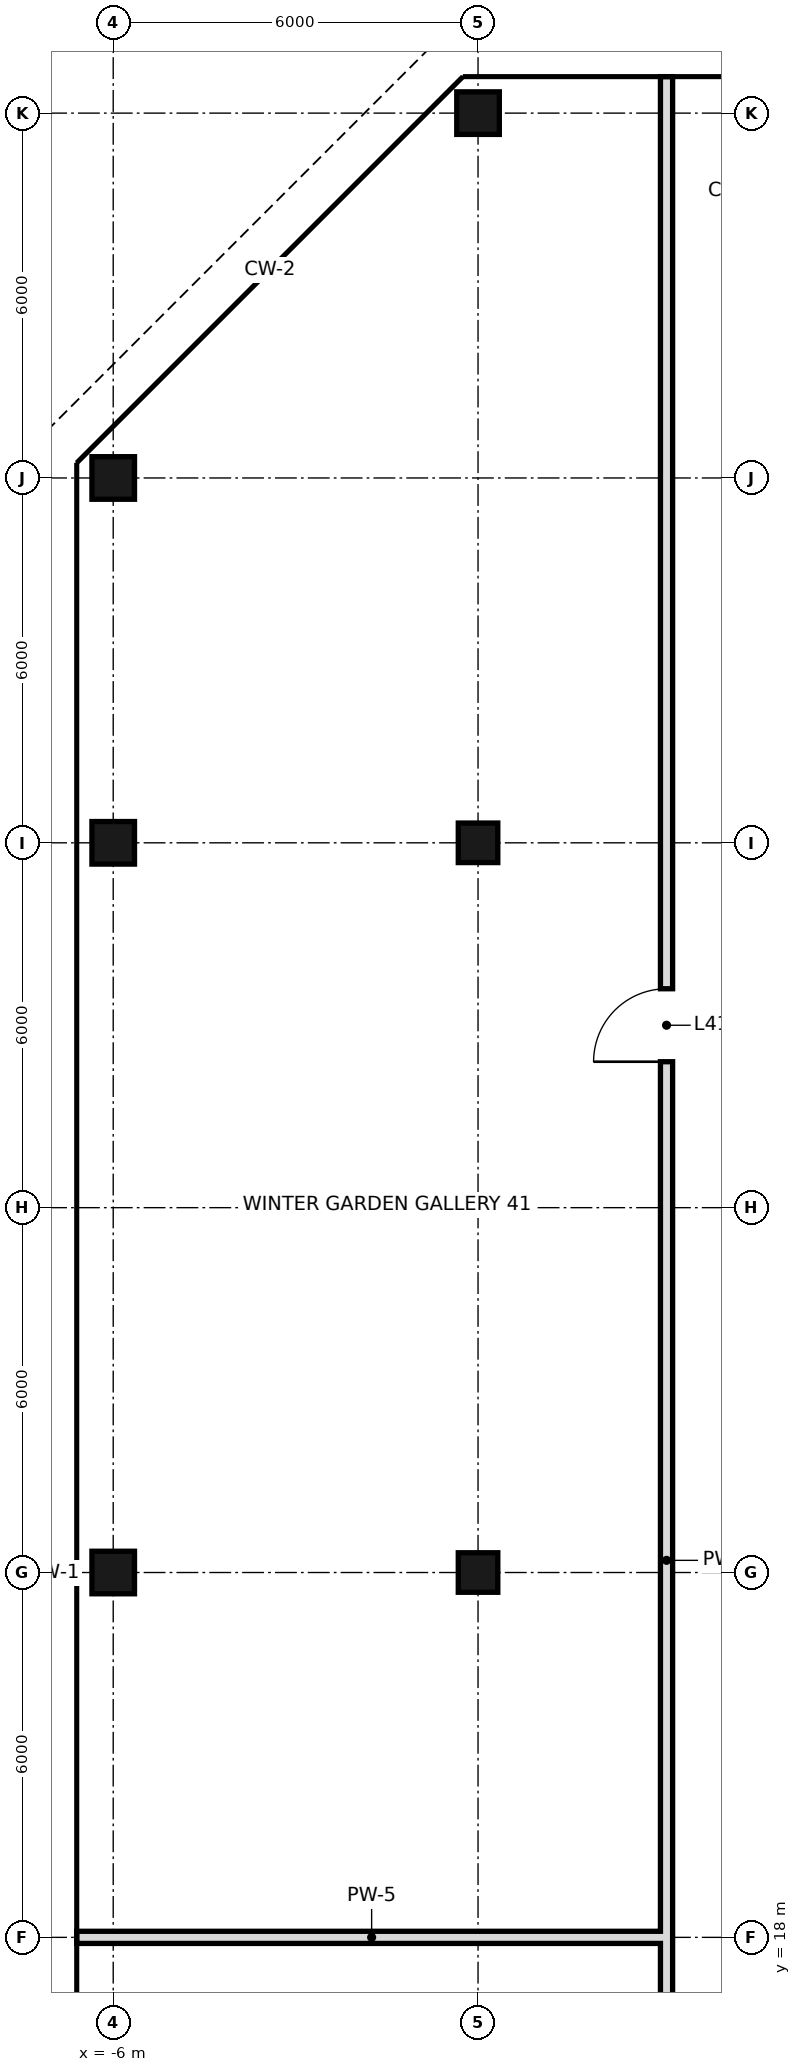
"""IFC4 building model, lengths in metres.
Left out: names, types, materials, properties, quantities, classifications, styles, units other than length and angle.
Written with IfcOpenShell. Run it as: python <this file> out.ifc"""

import sys

from ifc_helpers import new_model, si_unit, direction, frame, frame_2d, origin, origin_2d, place, context, subcontext, project, spatial, rectangle, hollow_rectangle, extrude, element, fill, save


model = new_model("IFC4")
c1 = context("Model", 3, precision=1e-05, world=origin(), true_north=direction((0.0, 1.0)))
c2 = subcontext(c1, "Body", "Model", "MODEL_VIEW")
j1 = project(units=[si_unit("LENGTHUNIT", "METRE"), si_unit("PLANEANGLEUNIT", "RADIAN")], contexts=[c1])
p1 = place(None, origin())
s1 = spatial("IfcSite", under=j1, at=p1, CompositionType="ELEMENT")
p2 = place(p1, origin())
s2 = spatial("IfcBuilding", under=s1, at=p2, CompositionType="ELEMENT")
p3 = place(p2, frame((0.0, 0.0, 178.0)))
s3 = spatial("IfcBuildingStorey", under=s2, at=p3, CompositionType="ELEMENT", Elevation=178.0)
for number, where, z_axis, x_axis in (
    (1, (-6.0, 24.0, 0.0), (0.0, 0.0, 1.0), (1.0, 0.0, 0.0)),
    (2, (-6.0, 36.0, 0.0), (0.0, 0.0, 1.0), (1.0, 0.0, 0.0)),
    (3, (-6.0, 42.0, 0.0), (0.0, 0.0, 1.0), (1.0, 0.0, 0.0)),
):
    element("IfcColumn", number, at=place(p3, frame(where, z_axis=z_axis, x_axis=x_axis)), inside=s3, PredefinedType="COLUMN", context=c2, shape_type="SweptSolid", body=[
        extrude(hollow_rectangle(XDim=0.7, YDim=0.7, WallThickness=0.036, at=origin_2d()), origin(), (0.0, 0.0, 1.0), 3.6),
    ])
for number, where, z_axis, x_axis in (
    (4, (0.0, 24.0, 0.0), (0.0, 0.0, 1.0), (1.0, 0.0, 0.0)),
    (5, (0.0, 36.0, 0.0), (0.0, 0.0, 1.0), (1.0, 0.0, 0.0)),
):
    element("IfcColumn", number, at=place(p3, frame(where, z_axis=z_axis, x_axis=x_axis)), inside=s3, PredefinedType="COLUMN", context=c2, shape_type="SweptSolid", body=[
        extrude(hollow_rectangle(XDim=0.65, YDim=0.65, WallThickness=0.032, at=origin_2d()), origin(), (0.0, 0.0, 1.0), 3.6),
    ])
p4 = place(p3, frame((0.0, 48.0, 0.0), z_axis=(0.0, 0.0, 1.0), x_axis=(1.0, 0.0, 0.0)))
e6 = element("IfcColumn", 6, at=p4, inside=s3, PredefinedType="COLUMN", context=c2, shape_type="SweptSolid", body=[
    extrude(hollow_rectangle(XDim=0.7, YDim=0.7, WallThickness=0.036, at=origin_2d()), origin(), (0.0, 0.0, 1.0), 3.6),
])
p5 = place(p3, frame((3.1, 15.3, 0.0), z_axis=(0.0, 0.0, 1.0), x_axis=(0.0, 1.0, 0.0)))
e7 = element("IfcWall", 7, at=p5, inside=s3, PredefinedType="SOLIDWALL", context=c2, shape_type="SweptSolid", body=[
    extrude(rectangle(XDim=33.3, YDim=0.2, at=frame_2d((16.65, 0.0))), origin(), (0.0, 0.0, 1.0), 2.72),
])
p6 = place(p5, frame((17.1, 0.0, 0.0)))
e8 = element("IfcOpeningElement", 8, at=p6, cuts=e7, PredefinedType="OPENING", context=c2, shape_type="SweptSolid", body=[
    extrude(rectangle(XDim=1.2, YDim=2.4, at=frame_2d((0.6, 1.2))), frame((0.0, 0.11, 0.0), z_axis=(0.0, -1.0, 0.0), x_axis=(1.0, 0.0, 0.0)), (0.0, 0.0, 1.0), 0.22),
])
p7 = place(p3, frame((-6.6, 18.0, 0.0), z_axis=(0.0, 0.0, 1.0), x_axis=(1.0, 0.0, 0.0)))
e9 = element("IfcWall", 9, at=p7, inside=s3, PredefinedType="SOLIDWALL", context=c2, shape_type="SweptSolid", body=[
    extrude(rectangle(XDim=9.7, YDim=0.2, at=frame_2d((4.85, 0.0))), origin(), (0.0, 0.0, 1.0), 2.72),
])
p8 = place(p6, origin())
e10 = element("IfcDoor", 10, at=p8, inside=s3, OperationType="SINGLE_SWING_LEFT", PredefinedType="DOOR", context=c2, shape_type="SweptSolid", body=[
    extrude(rectangle(XDim=1.2, YDim=2.4, at=frame_2d((0.6, 1.2))), frame((0.0, 0.025, 0.0), z_axis=(0.0, -1.0, 0.0), x_axis=(1.0, 0.0, 0.0)), (0.0, 0.0, 1.0), 0.05),
])
fill(e8, e10)
save(model, sys.argv[1])
